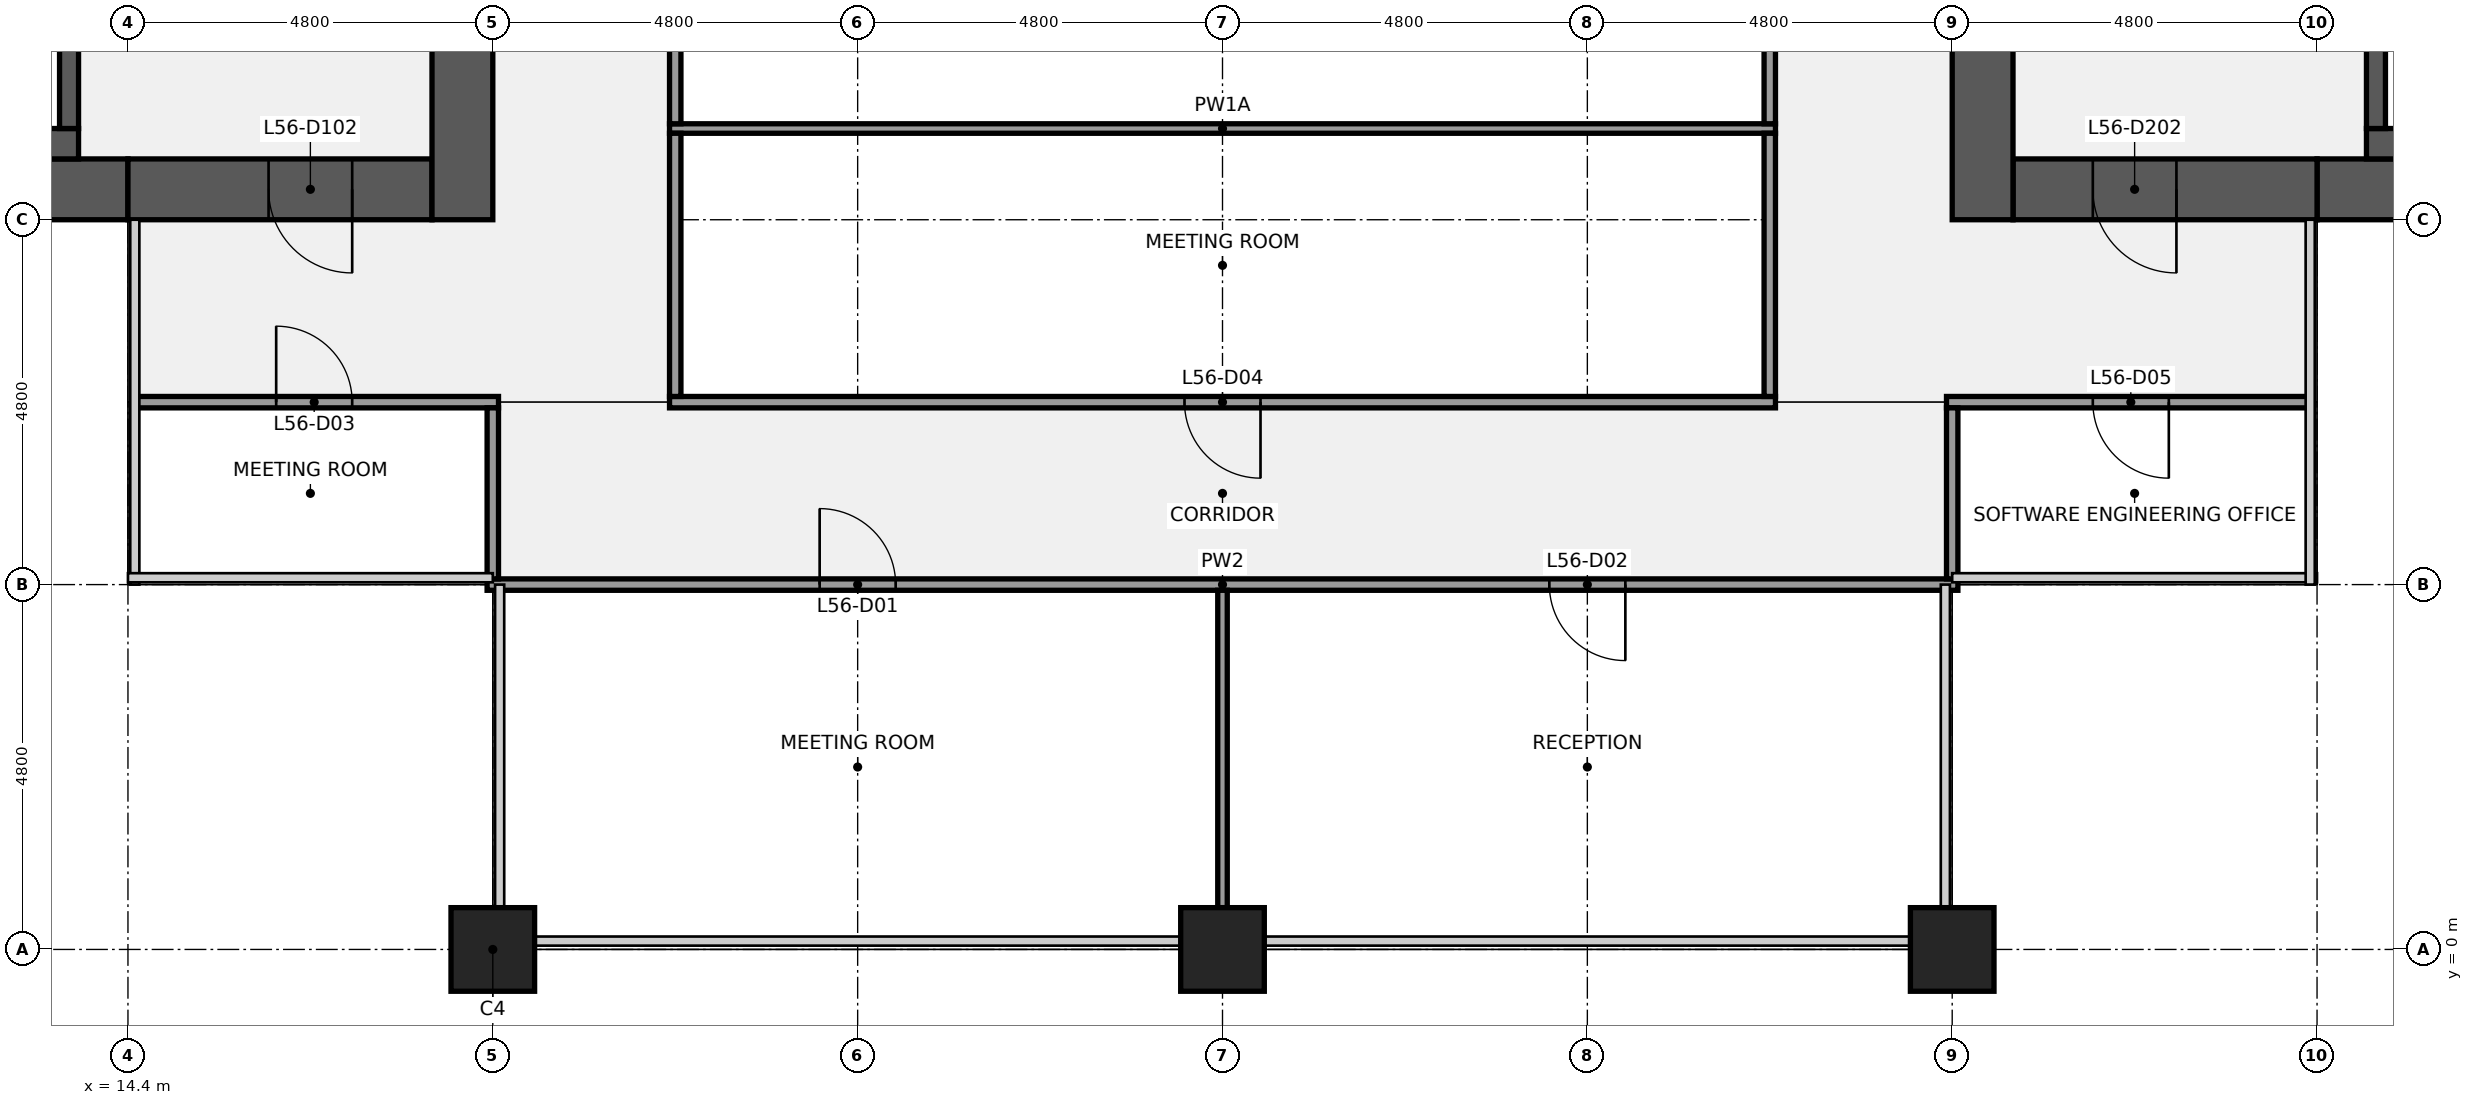
"""IFC4 building model, lengths in metres.
Left out: names, types, materials, properties, quantities, classifications, styles, units other than length and angle.
Written with IfcOpenShell. Run it as: python <this file> out.ifc"""

import sys

from ifc_helpers import new_model, si_unit, direction, frame, frame_2d, origin, origin_2d, place, context, subcontext, project, spatial, rectangle, extrude, element, fill, save


model = new_model("IFC4")
c1 = context("Model", 3, precision=1e-05, world=origin(), true_north=direction((0.0, 1.0)))
c2 = subcontext(c1, "Body", "Model", "MODEL_VIEW")
j1 = project(units=[si_unit("LENGTHUNIT", "METRE"), si_unit("PLANEANGLEUNIT", "RADIAN")], contexts=[c1])
p1 = place(None, origin())
s1 = spatial("IfcSite", under=j1, at=p1, CompositionType="ELEMENT")
p2 = place(p1, origin())
s2 = spatial("IfcBuilding", under=s1, at=p2, CompositionType="ELEMENT")
p3 = place(p2, frame((0.0, 0.0, 253.2)))
s3 = spatial("IfcBuildingStorey", under=s2, at=p3, CompositionType="ELEMENT", Elevation=253.2)
for number, where, z_axis, x_axis in (
    (1, (19.2, 0.0, 0.0), (0.0, 0.0, 1.0), (1.0, 0.0, 0.0)),
    (2, (28.8, 0.0, 0.0), (0.0, 0.0, 1.0), (1.0, 0.0, 0.0)),
    (3, (38.4, 0.0, 0.0), (0.0, 0.0, 1.0), (1.0, 0.0, 0.0)),
):
    element("IfcColumn", number, at=place(p3, frame(where, z_axis=z_axis, x_axis=x_axis)), inside=s3, PredefinedType="COLUMN", context=c2, shape_type="SweptSolid", body=[
        extrude(rectangle(XDim=1.1, YDim=1.1, at=origin_2d()), origin(), (0.0, 0.0, 1.0), 4.0),
    ])
p4 = place(p3, frame((14.4, 10.0, 0.0), z_axis=(0.0, 0.0, 1.0), x_axis=(-1.0, 0.0, 0.0)))
e4 = element("IfcWall", 4, at=p4, inside=s3, PredefinedType="SHEAR", context=c2, shape_type="SweptSolid", body=[
    extrude(rectangle(XDim=13.6, YDim=0.8, at=frame_2d((6.8, 0.0))), origin(), (0.0, 0.0, 1.0), 3.84),
])
p5 = place(p4, frame((6.3, 0.0, 0.9)))
e5 = element("IfcOpeningElement", 5, at=p5, cuts=e4, PredefinedType="OPENING", context=c2, shape_type="SweptSolid", body=[
    extrude(rectangle(XDim=1.8, YDim=1.5, at=frame_2d((0.9, 0.75))), frame((0.0, 0.41, 0.0), z_axis=(0.0, -1.0, 0.0), x_axis=(1.0, 0.0, 0.0)), (0.0, 0.0, 1.0), 0.82),
])
p6 = place(p4, frame((1.5, 0.0, 0.9)))
e6 = element("IfcOpeningElement", 6, at=p6, cuts=e4, PredefinedType="OPENING", context=c2, shape_type="SweptSolid", body=[
    extrude(rectangle(XDim=1.8, YDim=1.5, at=frame_2d((0.9, 0.75))), frame((0.0, 0.41, 0.0), z_axis=(0.0, -1.0, 0.0), x_axis=(1.0, 0.0, 0.0)), (0.0, 0.0, 1.0), 0.82),
])
p7 = place(p3, frame((18.4, 10.0, 0.0), z_axis=(0.0, 0.0, 1.0), x_axis=(-1.0, 0.0, 0.0)))
e7 = element("IfcWall", 7, at=p7, inside=s3, PredefinedType="SHEAR", context=c2, shape_type="SweptSolid", body=[
    extrude(rectangle(XDim=4.0, YDim=0.8, at=frame_2d((2.0, 0.0))), origin(), (0.0, 0.0, 1.0), 3.84),
])
p8 = place(p7, frame((1.05, 0.0, 0.0)))
e8 = element("IfcOpeningElement", 8, at=p8, cuts=e7, PredefinedType="OPENING", context=c2, shape_type="SweptSolid", body=[
    extrude(rectangle(XDim=1.1, YDim=2.1, at=frame_2d((0.55, 1.05))), frame((0.0, 0.41, 0.0), z_axis=(0.0, -1.0, 0.0), x_axis=(1.0, 0.0, 0.0)), (0.0, 0.0, 1.0), 0.82),
])
p9 = place(p3, frame((18.8, 38.4, 0.0), z_axis=(0.0, 0.0, 1.0), x_axis=(0.0, -1.0, 0.0)))
e9 = element("IfcWall", 9, at=p9, inside=s3, PredefinedType="SHEAR", context=c2, shape_type="SweptSolid", body=[
    extrude(rectangle(XDim=28.8, YDim=0.8, at=frame_2d((14.4, 0.0))), origin(), (0.0, 0.0, 1.0), 3.84),
])
p10 = place(p9, frame((18.3, 0.0, 0.0)))
e10 = element("IfcOpeningElement", 10, at=p10, cuts=e9, PredefinedType="OPENING", context=c2, shape_type="SweptSolid", body=[
    extrude(rectangle(XDim=1.8, YDim=2.1, at=frame_2d((0.9, 1.05))), frame((0.0, 0.41, 0.0), z_axis=(0.0, -1.0, 0.0), x_axis=(1.0, 0.0, 0.0)), (0.0, 0.0, 1.0), 0.82),
])
p11 = place(p9, frame((8.7, 0.0, 0.0)))
e11 = element("IfcOpeningElement", 11, at=p11, cuts=e9, PredefinedType="OPENING", context=c2, shape_type="SweptSolid", body=[
    extrude(rectangle(XDim=1.8, YDim=2.1, at=frame_2d((0.9, 1.05))), frame((0.0, 0.41, 0.0), z_axis=(0.0, -1.0, 0.0), x_axis=(1.0, 0.0, 0.0)), (0.0, 0.0, 1.0), 0.82),
])
p12 = place(p3, frame((6.25, 10.6, 0.0), z_axis=(0.0, 0.0, 1.0), x_axis=(1.0, 0.0, 0.0)))
e12 = element("IfcWall", 12, at=p12, inside=s3, PredefinedType="SHEAR", context=c2, shape_type="SweptSolid", body=[
    extrude(rectangle(XDim=7.5, YDim=0.4, at=frame_2d((3.75, 0.0))), origin(), (0.0, 0.0, 1.0), 3.84),
])
p13 = place(p3, frame((13.625, 10.8, 0.0), z_axis=(0.0, 0.0, 1.0), x_axis=(0.0, 1.0, 0.0)))
e13 = element("IfcWall", 13, at=p13, inside=s3, PredefinedType="SHEAR", context=c2, shape_type="SweptSolid", body=[
    extrude(rectangle(XDim=3.45, YDim=0.25, at=frame_2d((1.725, 0.0))), origin(), (0.0, 0.0, 1.0), 3.84),
])
p14 = place(p13, frame((1.175, 0.0, 0.0)))
e14 = element("IfcOpeningElement", 14, at=p14, cuts=e13, PredefinedType="OPENING", context=c2, shape_type="SweptSolid", body=[
    extrude(rectangle(XDim=1.1, YDim=2.1, at=frame_2d((0.55, 1.05))), frame((0.0, 0.135, 0.0), z_axis=(0.0, -1.0, 0.0), x_axis=(1.0, 0.0, 0.0)), (0.0, 0.0, 1.0), 0.27),
])
p15 = place(p3, frame((56.8, 10.0, 0.0), z_axis=(0.0, 0.0, 1.0), x_axis=(-1.0, 0.0, 0.0)))
e15 = element("IfcWall", 15, at=p15, inside=s3, PredefinedType="SHEAR", context=c2, shape_type="SweptSolid", body=[
    extrude(rectangle(XDim=13.6, YDim=0.8, at=frame_2d((6.8, 0.0))), origin(), (0.0, 0.0, 1.0), 3.84),
])
p16 = place(p15, frame((5.5, 0.0, 0.9)))
e16 = element("IfcOpeningElement", 16, at=p16, cuts=e15, PredefinedType="OPENING", context=c2, shape_type="SweptSolid", body=[
    extrude(rectangle(XDim=1.8, YDim=1.5, at=frame_2d((0.9, 0.75))), frame((0.0, 0.41, 0.0), z_axis=(0.0, -1.0, 0.0), x_axis=(1.0, 0.0, 0.0)), (0.0, 0.0, 1.0), 0.82),
])
p17 = place(p15, frame((10.3, 0.0, 0.9)))
e17 = element("IfcOpeningElement", 17, at=p17, cuts=e15, PredefinedType="OPENING", context=c2, shape_type="SweptSolid", body=[
    extrude(rectangle(XDim=1.8, YDim=1.5, at=frame_2d((0.9, 0.75))), frame((0.0, 0.41, 0.0), z_axis=(0.0, -1.0, 0.0), x_axis=(1.0, 0.0, 0.0)), (0.0, 0.0, 1.0), 0.82),
])
p18 = place(p3, frame((43.2, 10.0, 0.0), z_axis=(0.0, 0.0, 1.0), x_axis=(-1.0, 0.0, 0.0)))
e18 = element("IfcWall", 18, at=p18, inside=s3, PredefinedType="SHEAR", context=c2, shape_type="SweptSolid", body=[
    extrude(rectangle(XDim=4.0, YDim=0.8, at=frame_2d((2.0, 0.0))), origin(), (0.0, 0.0, 1.0), 3.84),
])
p19 = place(p18, frame((1.85, 0.0, 0.0)))
e19 = element("IfcOpeningElement", 19, at=p19, cuts=e18, PredefinedType="OPENING", context=c2, shape_type="SweptSolid", body=[
    extrude(rectangle(XDim=1.1, YDim=2.1, at=frame_2d((0.55, 1.05))), frame((0.0, 0.41, 0.0), z_axis=(0.0, -1.0, 0.0), x_axis=(1.0, 0.0, 0.0)), (0.0, 0.0, 1.0), 0.82),
])
p20 = place(p3, frame((38.8, 9.6, 0.0), z_axis=(0.0, 0.0, 1.0), x_axis=(0.0, 1.0, 0.0)))
e20 = element("IfcWall", 20, at=p20, inside=s3, PredefinedType="SHEAR", context=c2, shape_type="SweptSolid", body=[
    extrude(rectangle(XDim=28.8, YDim=0.8, at=frame_2d((14.4, 0.0))), origin(), (0.0, 0.0, 1.0), 3.84),
])
p21 = place(p20, frame((8.7, 0.0, 0.0)))
e21 = element("IfcOpeningElement", 21, at=p21, cuts=e20, PredefinedType="OPENING", context=c2, shape_type="SweptSolid", body=[
    extrude(rectangle(XDim=1.8, YDim=2.1, at=frame_2d((0.9, 1.05))), frame((0.0, 0.41, 0.0), z_axis=(0.0, -1.0, 0.0), x_axis=(1.0, 0.0, 0.0)), (0.0, 0.0, 1.0), 0.82),
])
p22 = place(p20, frame((18.3, 0.0, 0.0)))
e22 = element("IfcOpeningElement", 22, at=p22, cuts=e20, PredefinedType="OPENING", context=c2, shape_type="SweptSolid", body=[
    extrude(rectangle(XDim=1.8, YDim=2.1, at=frame_2d((0.9, 1.05))), frame((0.0, 0.41, 0.0), z_axis=(0.0, -1.0, 0.0), x_axis=(1.0, 0.0, 0.0)), (0.0, 0.0, 1.0), 0.82),
])
p23 = place(p3, frame((43.85, 10.6, 0.0), z_axis=(0.0, 0.0, 1.0), x_axis=(1.0, 0.0, 0.0)))
e23 = element("IfcWall", 23, at=p23, inside=s3, PredefinedType="SHEAR", context=c2, shape_type="SweptSolid", body=[
    extrude(rectangle(XDim=7.5, YDim=0.4, at=frame_2d((3.75, 0.0))), origin(), (0.0, 0.0, 1.0), 3.84),
])
p24 = place(p3, frame((43.975, 10.8, 0.0), z_axis=(0.0, 0.0, 1.0), x_axis=(0.0, 1.0, 0.0)))
e24 = element("IfcWall", 24, at=p24, inside=s3, PredefinedType="SHEAR", context=c2, shape_type="SweptSolid", body=[
    extrude(rectangle(XDim=3.45, YDim=0.25, at=frame_2d((1.725, 0.0))), origin(), (0.0, 0.0, 1.0), 3.84),
])
p25 = place(p24, frame((1.175, 0.0, 0.0)))
e25 = element("IfcOpeningElement", 25, at=p25, cuts=e24, PredefinedType="OPENING", context=c2, shape_type="SweptSolid", body=[
    extrude(rectangle(XDim=1.1, YDim=2.1, at=frame_2d((0.55, 1.05))), frame((0.0, 0.135, 0.0), z_axis=(0.0, -1.0, 0.0), x_axis=(1.0, 0.0, 0.0)), (0.0, 0.0, 1.0), 0.27),
])
p26 = place(p3, frame((19.125, 4.8, 0.0), z_axis=(0.0, 0.0, 1.0), x_axis=(1.0, 0.0, 0.0)))
e26 = element("IfcWall", 26, at=p26, inside=s3, PredefinedType="PARTITIONING", context=c2, shape_type="SweptSolid", body=[
    extrude(rectangle(XDim=19.35, YDim=0.15, at=frame_2d((9.675, 0.0))), origin(), (0.0, 0.0, 1.0), 2.849),
])
p27 = place(p26, frame((4.375, 0.0, 0.0)))
e27 = element("IfcOpeningElement", 27, at=p27, cuts=e26, PredefinedType="OPENING", context=c2, shape_type="SweptSolid", body=[
    extrude(rectangle(XDim=1.0, YDim=2.1, at=frame_2d((0.5, 1.05))), frame((0.0, 0.085, 0.0), z_axis=(0.0, -1.0, 0.0), x_axis=(1.0, 0.0, 0.0)), (0.0, 0.0, 1.0), 0.17),
])
p28 = place(p26, frame((13.975, 0.0, 0.0)))
e28 = element("IfcOpeningElement", 28, at=p28, cuts=e26, PredefinedType="OPENING", context=c2, shape_type="SweptSolid", body=[
    extrude(rectangle(XDim=1.0, YDim=2.1, at=frame_2d((0.5, 1.05))), frame((0.0, 0.085, 0.0), z_axis=(0.0, -1.0, 0.0), x_axis=(1.0, 0.0, 0.0)), (0.0, 0.0, 1.0), 0.17),
])
p29 = place(p3, frame((14.5, 7.2, 0.0), z_axis=(0.0, 0.0, 1.0), x_axis=(1.0, 0.0, 0.0)))
e29 = element("IfcWall", 29, at=p29, inside=s3, PredefinedType="PARTITIONING", context=c2, shape_type="SweptSolid", body=[
    extrude(rectangle(XDim=4.775, YDim=0.15, at=frame_2d((2.387, 0.0))), origin(), (0.0, 0.0, 1.0), 2.849),
])
p30 = place(p29, frame((1.85, 0.0, 0.0)))
e30 = element("IfcOpeningElement", 30, at=p30, cuts=e29, PredefinedType="OPENING", context=c2, shape_type="SweptSolid", body=[
    extrude(rectangle(XDim=1.0, YDim=2.1, at=frame_2d((0.5, 1.05))), frame((0.0, 0.085, 0.0), z_axis=(0.0, -1.0, 0.0), x_axis=(1.0, 0.0, 0.0)), (0.0, 0.0, 1.0), 0.17),
])
p31 = place(p3, frame((21.525, 7.2, 0.0), z_axis=(0.0, 0.0, 1.0), x_axis=(1.0, 0.0, 0.0)))
e31 = element("IfcWall", 31, at=p31, inside=s3, PredefinedType="PARTITIONING", context=c2, shape_type="SweptSolid", body=[
    extrude(rectangle(XDim=14.55, YDim=0.15, at=frame_2d((7.275, 0.0))), origin(), (0.0, 0.0, 1.0), 2.849),
])
p32 = place(p31, frame((6.775, 0.0, 0.0)))
e32 = element("IfcOpeningElement", 32, at=p32, cuts=e31, PredefinedType="OPENING", context=c2, shape_type="SweptSolid", body=[
    extrude(rectangle(XDim=1.0, YDim=2.1, at=frame_2d((0.5, 1.05))), frame((0.0, 0.085, 0.0), z_axis=(0.0, -1.0, 0.0), x_axis=(1.0, 0.0, 0.0)), (0.0, 0.0, 1.0), 0.17),
])
p33 = place(p3, frame((38.325, 7.2, 0.0), z_axis=(0.0, 0.0, 1.0), x_axis=(1.0, 0.0, 0.0)))
e33 = element("IfcWall", 33, at=p33, inside=s3, PredefinedType="PARTITIONING", context=c2, shape_type="SweptSolid", body=[
    extrude(rectangle(XDim=4.775, YDim=0.15, at=frame_2d((2.388, 0.0))), origin(), (0.0, 0.0, 1.0), 2.849),
])
p34 = place(p33, frame((1.925, 0.0, 0.0)))
e34 = element("IfcOpeningElement", 34, at=p34, cuts=e33, PredefinedType="OPENING", context=c2, shape_type="SweptSolid", body=[
    extrude(rectangle(XDim=1.0, YDim=2.1, at=frame_2d((0.5, 1.05))), frame((0.0, 0.085, 0.0), z_axis=(0.0, -1.0, 0.0), x_axis=(1.0, 0.0, 0.0)), (0.0, 0.0, 1.0), 0.17),
])
p35 = place(p3, frame((21.525, 10.8, 0.0), z_axis=(0.0, 0.0, 1.0), x_axis=(1.0, 0.0, 0.0)))
e35 = element("IfcWall", 35, at=p35, inside=s3, PredefinedType="PARTITIONING", context=c2, shape_type="SweptSolid", body=[
    extrude(rectangle(XDim=14.55, YDim=0.125, at=frame_2d((7.275, 0.0))), origin(), (0.0, 0.0, 1.0), 2.849),
])
p36 = place(p3, frame((19.2, 4.875, 0.0), z_axis=(0.0, 0.0, 1.0), x_axis=(0.0, 1.0, 0.0)))
e36 = element("IfcWall", 36, at=p36, inside=s3, PredefinedType="PARTITIONING", context=c2, shape_type="SweptSolid", body=[
    extrude(rectangle(XDim=2.25, YDim=0.15, at=frame_2d((1.125, 0.0))), origin(), (0.0, 0.0, 1.0), 2.849),
])
p37 = place(p3, frame((21.6, 7.275, 0.0), z_axis=(0.0, 0.0, 1.0), x_axis=(0.0, 1.0, 0.0)))
e37 = element("IfcWall", 37, at=p37, inside=s3, PredefinedType="PARTITIONING", context=c2, shape_type="SweptSolid", body=[
    extrude(rectangle(XDim=3.463, YDim=0.15, at=frame_2d((1.731, 0.0))), origin(), (0.0, 0.0, 1.0), 2.849),
])
p38 = place(p3, frame((21.6, 10.863, 0.0), z_axis=(0.0, 0.0, 1.0), x_axis=(0.0, 1.0, 0.0)))
e38 = element("IfcWall", 38, at=p38, inside=s3, PredefinedType="PARTITIONING", context=c2, shape_type="SweptSolid", body=[
    extrude(rectangle(XDim=5.875, YDim=0.15, at=frame_2d((2.938, 0.0))), origin(), (0.0, 0.0, 1.0), 2.849),
])
p39 = place(p38, frame((2.438, 0.0, 0.0)))
e39 = element("IfcOpeningElement", 39, at=p39, cuts=e38, PredefinedType="OPENING", context=c2, shape_type="SweptSolid", body=[
    extrude(rectangle(XDim=1.0, YDim=2.1, at=frame_2d((0.5, 1.05))), frame((0.0, 0.085, 0.0), z_axis=(0.0, -1.0, 0.0), x_axis=(1.0, 0.0, 0.0)), (0.0, 0.0, 1.0), 0.17),
])
p40 = place(p3, frame((28.8, 0.55, 0.0), z_axis=(0.0, 0.0, 1.0), x_axis=(0.0, 1.0, 0.0)))
e40 = element("IfcWall", 40, at=p40, inside=s3, PredefinedType="PARTITIONING", context=c2, shape_type="SweptSolid", body=[
    extrude(rectangle(XDim=4.175, YDim=0.125, at=frame_2d((2.087, 0.0))), origin(), (0.0, 0.0, 1.0), 2.849),
])
p41 = place(p3, frame((36.0, 7.275, 0.0), z_axis=(0.0, 0.0, 1.0), x_axis=(0.0, 1.0, 0.0)))
e41 = element("IfcWall", 41, at=p41, inside=s3, PredefinedType="PARTITIONING", context=c2, shape_type="SweptSolid", body=[
    extrude(rectangle(XDim=3.463, YDim=0.15, at=frame_2d((1.731, 0.0))), origin(), (0.0, 0.0, 1.0), 2.849),
])
p42 = place(p3, frame((36.0, 10.863, 0.0), z_axis=(0.0, 0.0, 1.0), x_axis=(0.0, 1.0, 0.0)))
e42 = element("IfcWall", 42, at=p42, inside=s3, PredefinedType="PARTITIONING", context=c2, shape_type="SweptSolid", body=[
    extrude(rectangle(XDim=5.875, YDim=0.15, at=frame_2d((2.938, 0.0))), origin(), (0.0, 0.0, 1.0), 2.849),
])
p43 = place(p3, frame((38.4, 4.875, 0.0), z_axis=(0.0, 0.0, 1.0), x_axis=(0.0, 1.0, 0.0)))
e43 = element("IfcWall", 43, at=p43, inside=s3, PredefinedType="PARTITIONING", context=c2, shape_type="SweptSolid", body=[
    extrude(rectangle(XDim=2.25, YDim=0.15, at=frame_2d((1.125, 0.0))), origin(), (0.0, 0.0, 1.0), 2.849),
])
for number, where, z_axis, x_axis in (
    (44, (19.2, -1.025, 0.0), (0.0, 0.0, 1.0), (1.0, 0.0, 0.0)),
    (45, (38.4, -1.025, 0.0), (0.0, 0.0, 1.0), (1.0, 0.0, 0.0)),
):
    element("IfcColumn", number, at=place(p3, frame(where, z_axis=z_axis, x_axis=x_axis)), inside=s3, PredefinedType="PILASTER", context=c2, shape_type="SweptSolid", body=[
        extrude(rectangle(XDim=2.4, YDim=0.95, at=origin_2d()), origin(), (0.0, 0.0, 1.0), 4.0),
    ])
p44 = place(p8, origin())
e46 = element("IfcDoor", 46, at=p44, inside=s3, OperationType="SINGLE_SWING_LEFT", PredefinedType="DOOR", context=c2, shape_type="SweptSolid", body=[
    extrude(rectangle(XDim=1.1, YDim=2.1, at=frame_2d((0.55, 1.05))), frame((0.0, 0.025, 0.0), z_axis=(0.0, -1.0, 0.0), x_axis=(1.0, 0.0, 0.0)), (0.0, 0.0, 1.0), 0.05),
])
fill(e8, e46)
p45 = place(p19, origin())
e47 = element("IfcDoor", 47, at=p45, inside=s3, OperationType="SINGLE_SWING_LEFT", PredefinedType="DOOR", context=c2, shape_type="SweptSolid", body=[
    extrude(rectangle(XDim=1.1, YDim=2.1, at=frame_2d((0.55, 1.05))), frame((0.0, 0.025, 0.0), z_axis=(0.0, -1.0, 0.0), x_axis=(1.0, 0.0, 0.0)), (0.0, 0.0, 1.0), 0.05),
])
fill(e19, e47)
p46 = place(p27, origin())
e48 = element("IfcDoor", 48, at=p46, inside=s3, OperationType="SINGLE_SWING_LEFT", PredefinedType="DOOR", context=c2, shape_type="SweptSolid", body=[
    extrude(rectangle(XDim=1.0, YDim=2.1, at=frame_2d((0.5, 1.05))), frame((0.0, 0.025, 0.0), z_axis=(0.0, -1.0, 0.0), x_axis=(1.0, 0.0, 0.0)), (0.0, 0.0, 1.0), 0.05),
])
fill(e27, e48)
p47 = place(p28, origin())
e49 = element("IfcDoor", 49, at=p47, inside=s3, OperationType="SINGLE_SWING_RIGHT", PredefinedType="DOOR", context=c2, shape_type="SweptSolid", body=[
    extrude(rectangle(XDim=1.0, YDim=2.1, at=frame_2d((0.5, 1.05))), frame((0.0, 0.025, 0.0), z_axis=(0.0, -1.0, 0.0), x_axis=(1.0, 0.0, 0.0)), (0.0, 0.0, 1.0), 0.05),
])
fill(e28, e49)
p48 = place(p30, origin())
e50 = element("IfcDoor", 50, at=p48, inside=s3, OperationType="SINGLE_SWING_LEFT", PredefinedType="DOOR", context=c2, shape_type="SweptSolid", body=[
    extrude(rectangle(XDim=1.0, YDim=2.1, at=frame_2d((0.5, 1.05))), frame((0.0, 0.025, 0.0), z_axis=(0.0, -1.0, 0.0), x_axis=(1.0, 0.0, 0.0)), (0.0, 0.0, 1.0), 0.05),
])
fill(e30, e50)
p49 = place(p32, origin())
e51 = element("IfcDoor", 51, at=p49, inside=s3, OperationType="SINGLE_SWING_RIGHT", PredefinedType="DOOR", context=c2, shape_type="SweptSolid", body=[
    extrude(rectangle(XDim=1.0, YDim=2.1, at=frame_2d((0.5, 1.05))), frame((0.0, 0.025, 0.0), z_axis=(0.0, -1.0, 0.0), x_axis=(1.0, 0.0, 0.0)), (0.0, 0.0, 1.0), 0.05),
])
fill(e32, e51)
p50 = place(p34, origin())
e52 = element("IfcDoor", 52, at=p50, inside=s3, OperationType="SINGLE_SWING_RIGHT", PredefinedType="DOOR", context=c2, shape_type="SweptSolid", body=[
    extrude(rectangle(XDim=1.0, YDim=2.1, at=frame_2d((0.5, 1.05))), frame((0.0, 0.025, 0.0), z_axis=(0.0, -1.0, 0.0), x_axis=(1.0, 0.0, 0.0)), (0.0, 0.0, 1.0), 0.05),
])
fill(e34, e52)
save(model, sys.argv[1])
